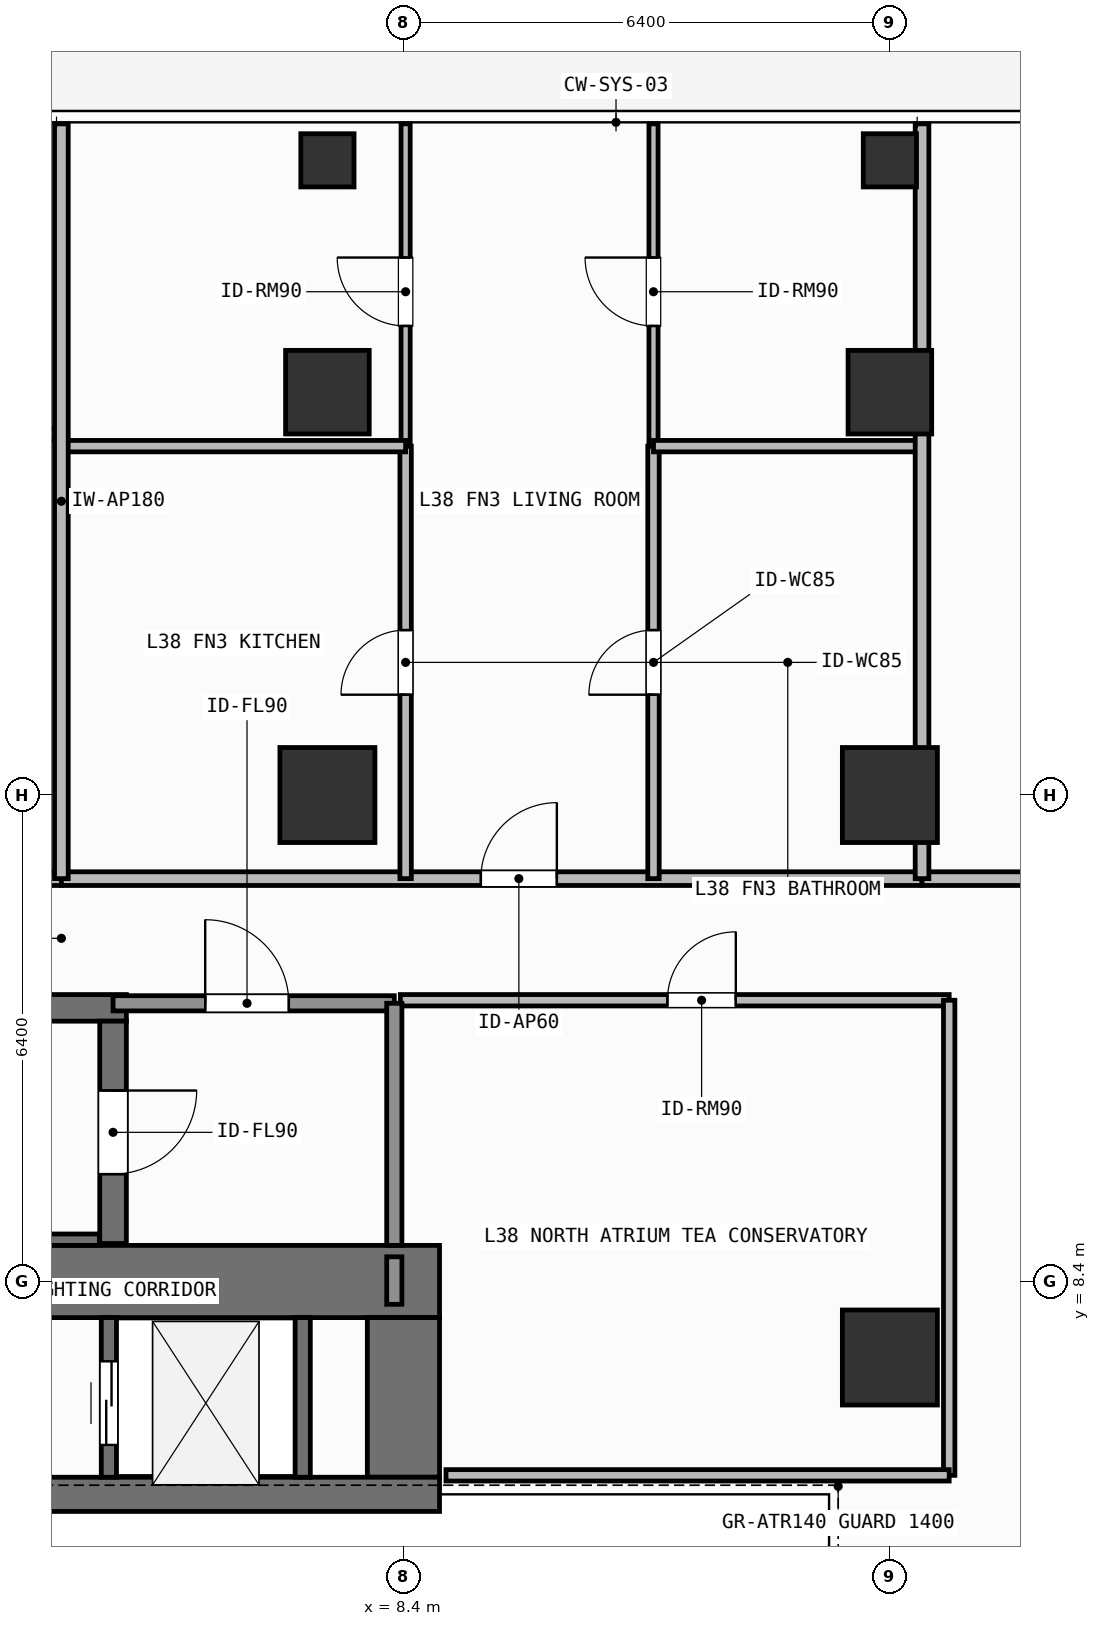
"""IFC4 building model, lengths in metres.
Left out: names, types, materials, properties, quantities, classifications, styles, units other than length and angle.
Written with IfcOpenShell. Run it as: python <this file> out.ifc"""

import sys

from ifc_helpers import new_model, si_unit, direction, frame, frame_2d, origin, origin_2d, place, context, subcontext, project, spatial, rectangle, hollow_rectangle, extrude, element, fill, save


model = new_model("IFC4")
c1 = context("Model", 3, precision=1e-05, world=origin(), true_north=direction((0.0, 1.0)))
c2 = subcontext(c1, "Body", "Model", "MODEL_VIEW")
j1 = project(units=[si_unit("LENGTHUNIT", "METRE"), si_unit("PLANEANGLEUNIT", "RADIAN")], contexts=[c1])
p1 = place(None, origin())
s1 = spatial("IfcSite", under=j1, at=p1, CompositionType="ELEMENT")
p2 = place(p1, origin())
s2 = spatial("IfcBuilding", under=s1, at=p2, CompositionType="ELEMENT")
p3 = place(p2, frame((0.0, 0.0, 152.4)))
s3 = spatial("IfcBuildingStorey", under=s2, at=p3, CompositionType="ELEMENT", Elevation=152.4)
p4 = place(p3, frame((-7.55, 8.4, 0.0), z_axis=(0.0, 0.0, 1.0), x_axis=(1.0, 0.0, 0.0)))
e1 = element("IfcWall", 1, at=p4, inside=s3, PredefinedType="SHEAR", context=c2, shape_type="SweptSolid", body=[
    extrude(rectangle(XDim=16.425, YDim=0.95, at=frame_2d((8.212, 0.0))), origin(), (0.0, 0.0, 1.0), 3.9),
])
p5 = place(p3, frame((8.4, 5.825, 0.0), z_axis=(0.0, 0.0, 1.0), x_axis=(0.0, 1.0, 0.0)))
e2 = element("IfcWall", 2, at=p5, inside=s3, PredefinedType="SHEAR", context=c2, shape_type="SweptSolid", body=[
    extrude(rectangle(XDim=2.1, YDim=0.95, at=frame_2d((1.05, 0.0))), origin(), (0.0, 0.0, 1.0), 3.9),
])
p6 = place(p3, frame((3.045, 5.6, 0.0), z_axis=(0.0, 0.0, 1.0), x_axis=(1.0, 0.0, 0.0)))
e3 = element("IfcWall", 3, at=p6, inside=s3, PredefinedType="SHEAR", context=c2, shape_type="SweptSolid", body=[
    extrude(rectangle(XDim=5.83, YDim=0.45, at=frame_2d((2.915, 0.0))), origin(), (0.0, 0.0, 1.0), 3.9),
])
p7 = place(p3, frame((-2.555, 12.0, 0.0), z_axis=(0.0, 0.0, 1.0), x_axis=(1.0, 0.0, 0.0)))
e4 = element("IfcWall", 4, at=p7, inside=s3, PredefinedType="SHEAR", context=c2, shape_type="SweptSolid", body=[
    extrude(rectangle(XDim=7.31, YDim=0.35, at=frame_2d((3.655, 0.0))), origin(), (0.0, 0.0, 1.0), 3.9),
])
p8 = place(p3, frame((-2.2, 8.95, 0.0), z_axis=(0.0, 0.0, 1.0), x_axis=(1.0, 0.0, 0.0)))
e5 = element("IfcWall", 5, at=p8, inside=s3, PredefinedType="SHEAR", context=c2, shape_type="SweptSolid", body=[
    extrude(rectangle(XDim=6.6, YDim=0.15, at=frame_2d((3.3, 0.0))), origin(), (0.0, 0.0, 1.0), 3.9),
])
p9 = place(p3, frame((4.58, 11.825, 0.0), z_axis=(0.0, 0.0, 1.0), x_axis=(0.0, -1.0, 0.0)))
e6 = element("IfcWall", 6, at=p9, inside=s3, PredefinedType="SHEAR", context=c2, shape_type="SweptSolid", body=[
    extrude(rectangle(XDim=2.925, YDim=0.35, at=frame_2d((1.462, 0.0))), origin(), (0.0, 0.0, 1.0), 3.9),
])
p10 = place(p9, frame((0.913, 0.0, 0.0)))
e7 = element("IfcOpeningElement", 7, at=p10, cuts=e6, PredefinedType="OPENING", context=c2, shape_type="SweptSolid", body=[
    extrude(rectangle(XDim=1.1, YDim=2.15, at=frame_2d((0.55, 1.075))), frame((0.0, 0.185, 0.0), z_axis=(0.0, -1.0, 0.0), x_axis=(1.0, 0.0, 0.0)), (0.0, 0.0, 1.0), 0.37),
])
for number, where, z_axis, x_axis in (
    (8, (7.4, 14.8, 0.0), (0.0, 0.0, 1.0), (1.0, 0.0, 0.0)),
    (9, (14.8, 14.8, 0.0), (0.0, 0.0, 1.0), (1.0, 0.0, 0.0)),
    (10, (14.8, 7.4, 0.0), (0.0, 0.0, 1.0), (1.0, 0.0, 0.0)),
):
    element("IfcColumn", number, at=place(p3, frame(where, z_axis=z_axis, x_axis=x_axis)), inside=s3, PredefinedType="COLUMN", context=c2, shape_type="SweptSolid", body=[
        extrude(rectangle(XDim=1.25, YDim=1.25, at=origin_2d()), origin(), (0.0, 0.0, 1.0), 3.9),
    ])
for number, where, z_axis, x_axis in (
    (11, (7.4, 20.1, 0.0), (0.0, 0.0, 1.0), (1.0, 0.0, 0.0)),
    (12, (14.8, 20.1, 0.0), (0.0, 0.0, 1.0), (1.0, 0.0, 0.0)),
):
    element("IfcColumn", number, at=place(p3, frame(where, z_axis=z_axis, x_axis=x_axis)), inside=s3, PredefinedType="COLUMN", context=c2, shape_type="SweptSolid", body=[
        extrude(rectangle(XDim=1.1, YDim=1.1, at=origin_2d()), origin(), (0.0, 0.0, 1.0), 3.9),
    ])
for number, where, z_axis, x_axis in (
    (13, (7.4, 23.15, 0.0), (0.0, 0.0, 1.0), (1.0, 0.0, 0.0)),
    (14, (14.8, 23.15, 0.0), (0.0, 0.0, 1.0), (1.0, 0.0, 0.0)),
):
    element("IfcColumn", number, at=place(p3, frame(where, z_axis=z_axis, x_axis=x_axis)), inside=s3, PredefinedType="COLUMN", context=c2, shape_type="SweptSolid", body=[
        extrude(hollow_rectangle(XDim=0.7, YDim=0.7, WallThickness=0.032, at=origin_2d()), origin(), (0.0, 0.0, 1.0), 3.9),
    ])
p11 = place(p3, frame((4.525, 5.825, 0.0), z_axis=(0.0, 0.0, 1.0), x_axis=(0.0, 1.0, 0.0)))
e15 = element("IfcWall", 15, at=p11, inside=s3, PredefinedType="SHEAR", context=c2, shape_type="SweptSolid", body=[
    extrude(rectangle(XDim=2.1, YDim=0.2, at=frame_2d((1.05, 0.0))), origin(), (0.0, 0.0, 1.0), 3.6),
])
p12 = place(p11, frame((0.425, 0.0, 0.0)))
e16 = element("IfcOpeningElement", 16, at=p12, cuts=e15, PredefinedType="OPENING", context=c2, shape_type="SweptSolid", body=[
    extrude(rectangle(XDim=1.1, YDim=2.2, at=frame_2d((0.55, 1.1))), frame((0.0, 0.11, 0.0), z_axis=(0.0, -1.0, 0.0), x_axis=(1.0, 0.0, 0.0)), (0.0, 0.0, 1.0), 0.22),
])
p13 = place(p3, frame((7.075, 5.825, 0.0), z_axis=(0.0, 0.0, 1.0), x_axis=(0.0, 1.0, 0.0)))
e17 = element("IfcWall", 17, at=p13, inside=s3, PredefinedType="SHEAR", context=c2, shape_type="SweptSolid", body=[
    extrude(rectangle(XDim=2.1, YDim=0.2, at=frame_2d((1.05, 0.0))), origin(), (0.0, 0.0, 1.0), 3.6),
])
p14 = place(p3, frame((4.58, 12.06, 0.0), z_axis=(0.0, 0.0, 1.0), x_axis=(1.0, 0.0, 0.0)))
e18 = element("IfcWall", 18, at=p14, inside=s3, PredefinedType="SOLIDWALL", context=c2, shape_type="SweptSolid", body=[
    extrude(rectangle(XDim=3.7, YDim=0.2, at=frame_2d((1.85, 0.0))), origin(), (0.0, 0.0, 1.0), 3.6),
])
p15 = place(p14, frame((1.212, 0.0, 0.0)))
e19 = element("IfcOpeningElement", 19, at=p15, cuts=e18, PredefinedType="OPENING", context=c2, shape_type="SweptSolid", body=[
    extrude(rectangle(XDim=1.1, YDim=2.15, at=frame_2d((0.55, 1.075))), frame((0.0, 0.11, 0.0), z_axis=(0.0, -1.0, 0.0), x_axis=(1.0, 0.0, 0.0)), (0.0, 0.0, 1.0), 0.22),
])
p16 = place(p3, frame((8.36, 12.1, 0.0), z_axis=(0.0, 0.0, 1.0), x_axis=(1.0, 0.0, 0.0)))
e20 = element("IfcWall", 20, at=p16, inside=s3, PredefinedType="PARTITIONING", context=c2, shape_type="SweptSolid", body=[
    extrude(rectangle(XDim=7.22, YDim=0.15, at=frame_2d((3.61, 0.0))), origin(), (0.0, 0.0, 1.0), 3.6),
])
p17 = place(p16, frame((3.513, 0.0, 0.0)))
e21 = element("IfcOpeningElement", 21, at=p17, cuts=e20, PredefinedType="OPENING", context=c2, shape_type="SweptSolid", body=[
    extrude(rectangle(XDim=0.9, YDim=2.1, at=frame_2d((0.45, 1.05))), frame((0.0, 0.085, 0.0), z_axis=(0.0, -1.0, 0.0), x_axis=(1.0, 0.0, 0.0)), (0.0, 0.0, 1.0), 0.17),
])
p18 = place(p3, frame((-7.423, 13.7, 0.0), z_axis=(0.0, 0.0, 1.0), x_axis=(1.0, 0.0, 0.0)))
e22 = element("IfcWall", 22, at=p18, inside=s3, PredefinedType="PARTITIONING", context=c2, shape_type="SweptSolid", body=[
    extrude(rectangle(XDim=11.323, YDim=0.18, at=frame_2d((5.662, 0.0))), origin(), (0.0, 0.0, 1.0), 3.6),
])
p19 = place(p18, frame((5.34, 0.0, 0.0)))
e23 = element("IfcOpeningElement", 23, at=p19, cuts=e22, PredefinedType="OPENING", context=c2, shape_type="SweptSolid", body=[
    extrude(rectangle(XDim=1.0, YDim=2.2, at=frame_2d((0.5, 1.1))), frame((0.0, 0.1, 0.0), z_axis=(0.0, -1.0, 0.0), x_axis=(1.0, 0.0, 0.0)), (0.0, 0.0, 1.0), 0.2),
])
p20 = place(p3, frame((3.9, 13.7, 0.0), z_axis=(0.0, 0.0, 1.0), x_axis=(1.0, 0.0, 0.0)))
e24 = element("IfcWall", 24, at=p20, inside=s3, PredefinedType="PARTITIONING", context=c2, shape_type="SweptSolid", body=[
    extrude(rectangle(XDim=11.323, YDim=0.18, at=frame_2d((5.662, 0.0))), origin(), (0.0, 0.0, 1.0), 3.6),
])
p21 = place(p20, frame((5.519, 0.0, 0.0)))
e25 = element("IfcOpeningElement", 25, at=p21, cuts=e24, PredefinedType="OPENING", context=c2, shape_type="SweptSolid", body=[
    extrude(rectangle(XDim=1.0, YDim=2.2, at=frame_2d((0.5, 1.1))), frame((0.0, 0.1, 0.0), z_axis=(0.0, -1.0, 0.0), x_axis=(1.0, 0.0, 0.0)), (0.0, 0.0, 1.0), 0.2),
])
p22 = place(p3, frame((8.429, 13.7, 0.0), z_axis=(0.0, 0.0, 1.0), x_axis=(0.0, 1.0, 0.0)))
e26 = element("IfcWall", 26, at=p22, inside=s3, PredefinedType="PARTITIONING", context=c2, shape_type="SweptSolid", body=[
    extrude(rectangle(XDim=5.69, YDim=0.15, at=frame_2d((2.845, 0.0))), origin(), (0.0, 0.0, 1.0), 3.6),
])
p23 = place(p22, frame((2.42, 0.0, 0.0)))
e27 = element("IfcOpeningElement", 27, at=p23, cuts=e26, PredefinedType="OPENING", context=c2, shape_type="SweptSolid", body=[
    extrude(rectangle(XDim=0.85, YDim=2.1, at=frame_2d((0.425, 1.05))), frame((0.0, 0.085, 0.0), z_axis=(0.0, -1.0, 0.0), x_axis=(1.0, 0.0, 0.0)), (0.0, 0.0, 1.0), 0.17),
])
p24 = place(p3, frame((8.429, 19.39, 0.0), z_axis=(0.0, 0.0, 1.0), x_axis=(0.0, 1.0, 0.0)))
e28 = element("IfcWall", 28, at=p24, inside=s3, PredefinedType="PARTITIONING", context=c2, shape_type="SweptSolid", body=[
    extrude(rectangle(XDim=4.24, YDim=0.12, at=frame_2d((2.12, 0.0))), origin(), (0.0, 0.0, 1.0), 3.6),
])
p25 = place(p24, frame((1.581, 0.0, 0.0)))
e29 = element("IfcOpeningElement", 29, at=p25, cuts=e28, PredefinedType="OPENING", context=c2, shape_type="SweptSolid", body=[
    extrude(rectangle(XDim=0.9, YDim=2.1, at=frame_2d((0.45, 1.05))), frame((0.0, 0.07, 0.0), z_axis=(0.0, -1.0, 0.0), x_axis=(1.0, 0.0, 0.0)), (0.0, 0.0, 1.0), 0.14),
])
p26 = place(p3, frame((11.69, 13.7, 0.0), z_axis=(0.0, 0.0, 1.0), x_axis=(0.0, 1.0, 0.0)))
e30 = element("IfcWall", 30, at=p26, inside=s3, PredefinedType="PARTITIONING", context=c2, shape_type="SweptSolid", body=[
    extrude(rectangle(XDim=5.69, YDim=0.15, at=frame_2d((2.845, 0.0))), origin(), (0.0, 0.0, 1.0), 3.6),
])
p27 = place(p26, frame((2.42, 0.0, 0.0)))
e31 = element("IfcOpeningElement", 31, at=p27, cuts=e30, PredefinedType="OPENING", context=c2, shape_type="SweptSolid", body=[
    extrude(rectangle(XDim=0.85, YDim=2.1, at=frame_2d((0.425, 1.05))), frame((0.0, 0.085, 0.0), z_axis=(0.0, -1.0, 0.0), x_axis=(1.0, 0.0, 0.0)), (0.0, 0.0, 1.0), 0.17),
])
p28 = place(p3, frame((11.69, 19.39, 0.0), z_axis=(0.0, 0.0, 1.0), x_axis=(0.0, 1.0, 0.0)))
e32 = element("IfcWall", 32, at=p28, inside=s3, PredefinedType="PARTITIONING", context=c2, shape_type="SweptSolid", body=[
    extrude(rectangle(XDim=4.24, YDim=0.12, at=frame_2d((2.12, 0.0))), origin(), (0.0, 0.0, 1.0), 3.6),
])
p29 = place(p28, frame((1.581, 0.0, 0.0)))
e33 = element("IfcOpeningElement", 33, at=p29, cuts=e32, PredefinedType="OPENING", context=c2, shape_type="SweptSolid", body=[
    extrude(rectangle(XDim=0.9, YDim=2.1, at=frame_2d((0.45, 1.05))), frame((0.0, 0.07, 0.0), z_axis=(0.0, -1.0, 0.0), x_axis=(1.0, 0.0, 0.0)), (0.0, 0.0, 1.0), 0.14),
])
p30 = place(p3, frame((15.223, 13.7, 0.0), z_axis=(0.0, 0.0, 1.0), x_axis=(1.0, 0.0, 0.0)))
e34 = element("IfcWall", 34, at=p30, inside=s3, PredefinedType="PARTITIONING", context=c2, shape_type="SweptSolid", body=[
    extrude(rectangle(XDim=8.897, YDim=0.18, at=frame_2d((4.449, 0.0))), origin(), (0.0, 0.0, 1.0), 3.6),
])
p31 = place(p30, frame((2.451, 0.0, 0.0)))
e35 = element("IfcOpeningElement", 35, at=p31, cuts=e34, PredefinedType="OPENING", context=c2, shape_type="SweptSolid", body=[
    extrude(rectangle(XDim=1.0, YDim=2.2, at=frame_2d((0.5, 1.1))), frame((0.0, 0.1, 0.0), z_axis=(0.0, -1.0, 0.0), x_axis=(1.0, 0.0, 0.0)), (0.0, 0.0, 1.0), 0.2),
])
p32 = place(p3, frame((8.28, 8.875, 0.0), z_axis=(0.0, 0.0, 1.0), x_axis=(0.0, 1.0, 0.0)))
e36 = element("IfcWall", 36, at=p32, inside=s3, PredefinedType="SOLIDWALL", context=c2, shape_type="SweptSolid", body=[
    extrude(rectangle(XDim=3.185, YDim=0.2, at=frame_2d((1.593, 0.0))), origin(), (0.0, 0.0, 1.0), 3.6),
])
p33 = place(p3, frame((8.28, 8.1, 0.0), z_axis=(0.0, 0.0, 1.0), x_axis=(0.0, 1.0, 0.0)))
e37 = element("IfcWall", 37, at=p33, inside=s3, PredefinedType="SOLIDWALL", context=c2, shape_type="SweptSolid", body=[
    extrude(rectangle(XDim=0.625, YDim=0.2, at=frame_2d((0.312, 0.0))), origin(), (0.0, 0.0, 1.0), 3.6),
])
p34 = place(p3, frame((15.58, 5.85, 0.0), z_axis=(0.0, 0.0, 1.0), x_axis=(0.0, 1.0, 0.0)))
e38 = element("IfcWall", 38, at=p34, inside=s3, PredefinedType="PARTITIONING", context=c2, shape_type="SweptSolid", body=[
    extrude(rectangle(XDim=6.25, YDim=0.15, at=frame_2d((3.125, 0.0))), origin(), (0.0, 0.0, 1.0), 3.6),
])
p35 = place(p3, frame((8.96, 5.85, 0.0), z_axis=(0.0, 0.0, 1.0), x_axis=(1.0, 0.0, 0.0)))
e39 = element("IfcWall", 39, at=p35, inside=s3, PredefinedType="PARTITIONING", context=c2, shape_type="SweptSolid", body=[
    extrude(rectangle(XDim=6.62, YDim=0.15, at=frame_2d((3.31, 0.0))), origin(), (0.0, 0.0, 1.0), 3.6),
])
p36 = place(p3, frame((1.05, 19.545, 0.0), z_axis=(0.0, 0.0, 1.0), x_axis=(1.0, 0.0, 0.0)))
e40 = element("IfcWall", 40, at=p36, inside=s3, PredefinedType="PARTITIONING", context=c2, shape_type="SweptSolid", body=[
    extrude(rectangle(XDim=2.85, YDim=0.15, at=frame_2d((1.425, 0.0))), origin(), (0.0, 0.0, 1.0), 3.6),
])
p37 = place(p3, frame((3.9, 19.39, 0.0), z_axis=(0.0, 0.0, 1.0), x_axis=(1.0, 0.0, 0.0)))
e41 = element("IfcWall", 41, at=p37, inside=s3, PredefinedType="PARTITIONING", context=c2, shape_type="SweptSolid", body=[
    extrude(rectangle(XDim=4.529, YDim=0.15, at=frame_2d((2.265, 0.0))), origin(), (0.0, 0.0, 1.0), 3.6),
])
p38 = place(p3, frame((11.69, 19.39, 0.0), z_axis=(0.0, 0.0, 1.0), x_axis=(1.0, 0.0, 0.0)))
e42 = element("IfcWall", 42, at=p38, inside=s3, PredefinedType="PARTITIONING", context=c2, shape_type="SweptSolid", body=[
    extrude(rectangle(XDim=3.533, YDim=0.15, at=frame_2d((1.767, 0.0))), origin(), (0.0, 0.0, 1.0), 3.6),
])
for number, where, z_axis, x_axis in (
    (43, (3.9, 13.7, 0.0), (0.0, 0.0, 1.0), (0.0, 1.0, 0.0)),
    (44, (15.223, 13.7, 0.0), (0.0, 0.0, 1.0), (0.0, 1.0, 0.0)),
):
    element("IfcWall", number, at=place(p3, frame(where, z_axis=z_axis, x_axis=x_axis)), inside=s3, PredefinedType="PARTITIONING", context=c2, shape_type="SweptSolid", body=[
        extrude(rectangle(XDim=9.93, YDim=0.18, at=frame_2d((4.965, 0.0))), origin(), (0.0, 0.0, 1.0), 3.6),
    ])
p39 = place(p12, origin())
e45 = element("IfcDoor", 45, at=p39, inside=s3, OperationType="SLIDING_TO_LEFT", PredefinedType="DOOR", context=c2, shape_type="SweptSolid", body=[
    extrude(rectangle(XDim=1.1, YDim=2.2, at=frame_2d((0.55, 1.1))), frame((0.0, 0.025, 0.0), z_axis=(0.0, -1.0, 0.0), x_axis=(1.0, 0.0, 0.0)), (0.0, 0.0, 1.0), 0.05),
])
fill(e16, e45)
p40 = place(p10, origin())
e46 = element("IfcDoor", 46, at=p40, inside=s3, OperationType="SINGLE_SWING_LEFT", PredefinedType="DOOR", context=c2, shape_type="SweptSolid", body=[
    extrude(rectangle(XDim=1.1, YDim=2.15, at=frame_2d((0.55, 1.075))), frame((0.0, 0.025, 0.0), z_axis=(0.0, -1.0, 0.0), x_axis=(1.0, 0.0, 0.0)), (0.0, 0.0, 1.0), 0.05),
])
fill(e7, e46)
p41 = place(p15, origin())
e47 = element("IfcDoor", 47, at=p41, inside=s3, OperationType="SINGLE_SWING_LEFT", PredefinedType="DOOR", context=c2, shape_type="SweptSolid", body=[
    extrude(rectangle(XDim=1.1, YDim=2.15, at=frame_2d((0.55, 1.075))), frame((0.0, 0.025, 0.0), z_axis=(0.0, -1.0, 0.0), x_axis=(1.0, 0.0, 0.0)), (0.0, 0.0, 1.0), 0.05),
])
fill(e19, e47)
p42 = place(p17, origin())
e48 = element("IfcDoor", 48, at=p42, inside=s3, OperationType="SINGLE_SWING_RIGHT", PredefinedType="DOOR", context=c2, shape_type="SweptSolid", body=[
    extrude(rectangle(XDim=0.9, YDim=2.1, at=frame_2d((0.45, 1.05))), frame((0.0, 0.025, 0.0), z_axis=(0.0, -1.0, 0.0), x_axis=(1.0, 0.0, 0.0)), (0.0, 0.0, 1.0), 0.05),
])
fill(e21, e48)
p43 = place(p21, origin())
e49 = element("IfcDoor", 49, at=p43, inside=s3, OperationType="SINGLE_SWING_RIGHT", PredefinedType="DOOR", context=c2, shape_type="SweptSolid", body=[
    extrude(rectangle(XDim=1.0, YDim=2.2, at=frame_2d((0.5, 1.1))), frame((0.0, 0.025, 0.0), z_axis=(0.0, -1.0, 0.0), x_axis=(1.0, 0.0, 0.0)), (0.0, 0.0, 1.0), 0.05),
])
fill(e25, e49)
p44 = place(p23, origin())
e50 = element("IfcDoor", 50, at=p44, inside=s3, OperationType="SINGLE_SWING_LEFT", PredefinedType="DOOR", context=c2, shape_type="SweptSolid", body=[
    extrude(rectangle(XDim=0.85, YDim=2.1, at=frame_2d((0.425, 1.05))), frame((0.0, 0.025, 0.0), z_axis=(0.0, -1.0, 0.0), x_axis=(1.0, 0.0, 0.0)), (0.0, 0.0, 1.0), 0.05),
])
fill(e27, e50)
p45 = place(p25, origin())
e51 = element("IfcDoor", 51, at=p45, inside=s3, OperationType="SINGLE_SWING_RIGHT", PredefinedType="DOOR", context=c2, shape_type="SweptSolid", body=[
    extrude(rectangle(XDim=0.9, YDim=2.1, at=frame_2d((0.45, 1.05))), frame((0.0, 0.025, 0.0), z_axis=(0.0, -1.0, 0.0), x_axis=(1.0, 0.0, 0.0)), (0.0, 0.0, 1.0), 0.05),
])
fill(e29, e51)
p46 = place(p27, origin())
e52 = element("IfcDoor", 52, at=p46, inside=s3, OperationType="SINGLE_SWING_LEFT", PredefinedType="DOOR", context=c2, shape_type="SweptSolid", body=[
    extrude(rectangle(XDim=0.85, YDim=2.1, at=frame_2d((0.425, 1.05))), frame((0.0, 0.025, 0.0), z_axis=(0.0, -1.0, 0.0), x_axis=(1.0, 0.0, 0.0)), (0.0, 0.0, 1.0), 0.05),
])
fill(e31, e52)
p47 = place(p29, origin())
e53 = element("IfcDoor", 53, at=p47, inside=s3, OperationType="SINGLE_SWING_RIGHT", PredefinedType="DOOR", context=c2, shape_type="SweptSolid", body=[
    extrude(rectangle(XDim=0.9, YDim=2.1, at=frame_2d((0.45, 1.05))), frame((0.0, 0.025, 0.0), z_axis=(0.0, -1.0, 0.0), x_axis=(1.0, 0.0, 0.0)), (0.0, 0.0, 1.0), 0.05),
])
fill(e33, e53)
save(model, sys.argv[1])
